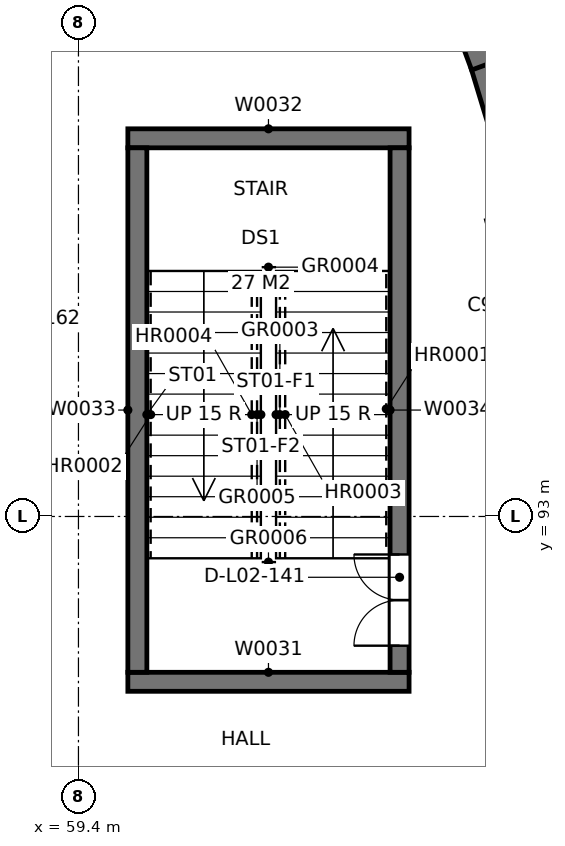
"""IFC4 building model, lengths in metres.
Left out: names, types, materials, properties, quantities, classifications, styles, units other than length and angle.
Written with IfcOpenShell. Run it as: python <this file> out.ifc"""

import sys

from ifc_helpers import new_model, si_unit, direction, frame, frame_2d, origin, place, context, subcontext, project, spatial, rectangle, extrude, element, fill, save


model = new_model("IFC4")
c1 = context("Model", 3, precision=1e-05, world=origin(), true_north=direction((0.0, 1.0)))
c2 = subcontext(c1, "Body", "Model", "MODEL_VIEW")
j1 = project(units=[si_unit("LENGTHUNIT", "METRE"), si_unit("PLANEANGLEUNIT", "RADIAN")], contexts=[c1])
p1 = place(None, origin())
s1 = spatial("IfcSite", under=j1, at=p1, CompositionType="ELEMENT")
p2 = place(p1, origin())
s2 = spatial("IfcBuilding", under=s1, at=p2, CompositionType="ELEMENT")
p3 = place(p2, frame((0.0, 0.0, 9.6)))
s3 = spatial("IfcBuildingStorey", under=s2, at=p3, CompositionType="ELEMENT", Elevation=9.6)
for number, where, z_axis, x_axis in (
    (1, (65.515, 96.631, 0.0), (0.0, 0.0, 1.0), (-0.291, 0.957, 0.0)),
    (2, (64.808, 98.96, 0.0), (0.0, 0.0, 1.0), (-0.347, 0.938, 0.0)),
):
    element("IfcWall", number, at=place(p3, frame(where, z_axis=z_axis, x_axis=x_axis)), inside=s3, PredefinedType="SOLIDWALL", context=c2, shape_type="SweptSolid", body=[
        extrude(rectangle(XDim=2.434, YDim=0.5, at=frame_2d((1.217, 0.0))), origin(), (0.0, 0.0, 1.0), 4.8),
    ])
for number, where, z_axis, x_axis in (
    (3, (60.05, 90.825, 0.0), (0.0, 0.0, 1.0), (1.0, 0.0, 0.0)),
    (4, (60.05, 97.975, 0.0), (0.0, 0.0, 1.0), (1.0, 0.0, 0.0)),
):
    element("IfcWall", number, at=place(p3, frame(where, z_axis=z_axis, x_axis=x_axis)), inside=s3, PredefinedType="SOLIDWALL", context=c2, shape_type="SweptSolid", body=[
        extrude(rectangle(XDim=3.7, YDim=0.25, at=frame_2d((1.85, 0.0))), origin(), (0.0, 0.0, 1.0), 4.8),
    ])
p4 = place(p3, frame((60.175, 90.95, 0.0), z_axis=(0.0, 0.0, 1.0), x_axis=(0.0, 1.0, 0.0)))
e5 = element("IfcWall", 5, at=p4, inside=s3, PredefinedType="SOLIDWALL", context=c2, shape_type="SweptSolid", body=[
    extrude(rectangle(XDim=6.9, YDim=0.25, at=frame_2d((3.45, 0.0))), origin(), (0.0, 0.0, 1.0), 4.8),
])
p5 = place(p3, frame((63.625, 90.95, 0.0), z_axis=(0.0, 0.0, 1.0), x_axis=(0.0, 1.0, 0.0)))
e6 = element("IfcWall", 6, at=p5, inside=s3, PredefinedType="SOLIDWALL", context=c2, shape_type="SweptSolid", body=[
    extrude(rectangle(XDim=6.9, YDim=0.25, at=frame_2d((3.45, 0.0))), origin(), (0.0, 0.0, 1.0), 4.8),
])
p6 = place(p5, frame((0.35, 0.0, 0.0)))
e7 = element("IfcOpeningElement", 7, at=p6, cuts=e6, PredefinedType="OPENING", context=c2, shape_type="SweptSolid", body=[
    extrude(rectangle(XDim=1.2, YDim=2.1, at=frame_2d((0.6, 1.05))), frame((0.0, 0.135, 0.0), z_axis=(0.0, -1.0, 0.0), x_axis=(1.0, 0.0, 0.0)), (0.0, 0.0, 1.0), 0.27),
])
p7 = place(p6, origin())
e8 = element("IfcDoor", 8, at=p7, inside=s3, OperationType="DOUBLE_DOOR_SINGLE_SWING", PredefinedType="DOOR", context=c2, shape_type="SweptSolid", body=[
    extrude(rectangle(XDim=1.2, YDim=2.1, at=frame_2d((0.6, 1.05))), frame((0.0, 0.025, 0.0), z_axis=(0.0, -1.0, 0.0), x_axis=(1.0, 0.0, 0.0)), (0.0, 0.0, 1.0), 0.05),
])
fill(e7, e8)
save(model, sys.argv[1])
